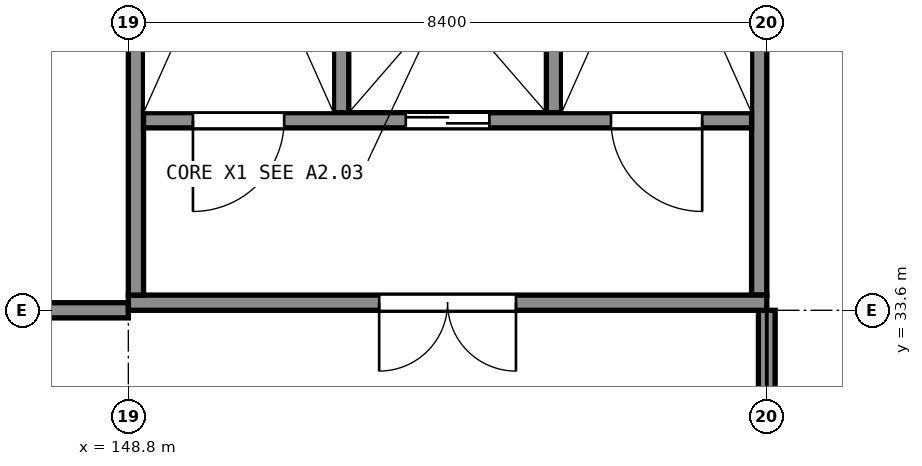
"""IFC4 building model, lengths in metres.
Left out: names, types, materials, properties, quantities, classifications, styles, units other than length and angle.
Written with IfcOpenShell. Run it as: python <this file> out.ifc"""

import sys

from ifc_helpers import new_model, si_unit, direction, frame, frame_2d, origin, place, context, subcontext, project, spatial, rectangle, extrude, element, fill, save


model = new_model("IFC4")
c1 = context("Model", 3, precision=1e-05, world=origin(), true_north=direction((0.0, 1.0)))
c2 = subcontext(c1, "Body", "Model", "MODEL_VIEW")
j1 = project(units=[si_unit("LENGTHUNIT", "METRE"), si_unit("PLANEANGLEUNIT", "RADIAN")], contexts=[c1])
p1 = place(None, origin())
s1 = spatial("IfcSite", under=j1, at=p1, CompositionType="ELEMENT")
p2 = place(p1, origin())
s2 = spatial("IfcBuilding", under=s1, at=p2, CompositionType="ELEMENT")
p3 = place(p2, frame((0.0, 0.0, 10.5)))
s3 = spatial("IfcBuildingStorey", under=s2, at=p3, CompositionType="ELEMENT", Elevation=10.5)
p4 = place(p3, frame((148.8, 33.7, 0.0), z_axis=(0.0, 0.0, 1.0), x_axis=(1.0, 0.0, 0.0)))
e1 = element("IfcWall", 1, at=p4, inside=s3, PredefinedType="SHEAR", context=c2, shape_type="SweptSolid", body=[
    extrude(rectangle(XDim=8.4, YDim=0.2, at=frame_2d((4.2, 0.0))), origin(), (0.0, 0.0, 1.0), 9.5),
])
p5 = place(p4, frame((3.3, 0.0, 0.0)))
e2 = element("IfcOpeningElement", 2, at=p5, cuts=e1, PredefinedType="OPENING", context=c2, shape_type="SweptSolid", body=[
    extrude(rectangle(XDim=1.8, YDim=2.1, at=frame_2d((0.9, 1.05))), frame((0.0, 0.11, 0.0), z_axis=(0.0, -1.0, 0.0), x_axis=(1.0, 0.0, 0.0)), (0.0, 0.0, 1.0), 0.22),
])
for number, where, z_axis, x_axis in (
    (3, (148.9, 33.8, 0.0), (0.0, 0.0, 1.0), (0.0, 1.0, 0.0)),
    (4, (157.1, 33.8, 0.0), (0.0, 0.0, 1.0), (0.0, 1.0, 0.0)),
):
    element("IfcWall", number, at=place(p3, frame(where, z_axis=z_axis, x_axis=x_axis)), inside=s3, PredefinedType="SHEAR", context=c2, shape_type="SweptSolid", body=[
        extrude(rectangle(XDim=8.0, YDim=0.2, at=frame_2d((4.0, 0.0))), origin(), (0.0, 0.0, 1.0), 9.5),
    ])
p6 = place(p3, frame((149.0, 36.1, 0.0), z_axis=(0.0, 0.0, 1.0), x_axis=(1.0, 0.0, 0.0)))
e5 = element("IfcWall", 5, at=p6, inside=s3, PredefinedType="SHEAR", context=c2, shape_type="SweptSolid", body=[
    extrude(rectangle(XDim=8.0, YDim=0.2, at=frame_2d((4.0, 0.0))), origin(), (0.0, 0.0, 1.0), 9.5),
])
p7 = place(p6, frame((0.65, 0.0, 0.0)))
e6 = element("IfcOpeningElement", 6, at=p7, cuts=e5, PredefinedType="OPENING", context=c2, shape_type="SweptSolid", body=[
    extrude(rectangle(XDim=1.2, YDim=2.1, at=frame_2d((0.6, 1.05))), frame((0.0, 0.11, 0.0), z_axis=(0.0, -1.0, 0.0), x_axis=(1.0, 0.0, 0.0)), (0.0, 0.0, 1.0), 0.22),
])
p8 = place(p6, frame((6.15, 0.0, 0.0)))
e7 = element("IfcOpeningElement", 7, at=p8, cuts=e5, PredefinedType="OPENING", context=c2, shape_type="SweptSolid", body=[
    extrude(rectangle(XDim=1.2, YDim=2.1, at=frame_2d((0.6, 1.05))), frame((0.0, 0.11, 0.0), z_axis=(0.0, -1.0, 0.0), x_axis=(1.0, 0.0, 0.0)), (0.0, 0.0, 1.0), 0.22),
])
p9 = place(p6, frame((3.45, 0.0, 0.0)))
e8 = element("IfcOpeningElement", 8, at=p9, cuts=e5, PredefinedType="OPENING", context=c2, shape_type="SweptSolid", body=[
    extrude(rectangle(XDim=1.1, YDim=2.1, at=frame_2d((0.55, 1.05))), frame((0.0, 0.11, 0.0), z_axis=(0.0, -1.0, 0.0), x_axis=(1.0, 0.0, 0.0)), (0.0, 0.0, 1.0), 0.22),
])
for number, where, z_axis, x_axis in (
    (9, (151.6, 36.2, 0.0), (0.0, 0.0, 1.0), (0.0, 1.0, 0.0)),
    (10, (154.4, 36.2, 0.0), (0.0, 0.0, 1.0), (0.0, 1.0, 0.0)),
):
    element("IfcWall", number, at=place(p3, frame(where, z_axis=z_axis, x_axis=x_axis)), inside=s3, PredefinedType="SHEAR", context=c2, shape_type="SweptSolid", body=[
        extrude(rectangle(XDim=5.6, YDim=0.2, at=frame_2d((2.8, 0.0))), origin(), (0.0, 0.0, 1.0), 9.5),
    ])
p10 = place(p3, frame((157.2, 25.55, 0.0), z_axis=(0.0, 0.0, 1.0), x_axis=(0.0, 1.0, 0.0)))
e11 = element("IfcWall", 11, at=p10, inside=s3, PredefinedType="SOLIDWALL", context=c2, shape_type="SweptSolid", body=[
    extrude(rectangle(XDim=8.05, YDim=0.22, at=frame_2d((4.025, 0.0))), origin(), (0.0, 0.0, 1.0), 8.44),
])
p11 = place(p10, frame((4.0, 0.0, 5.0)))
e12 = element("IfcOpeningElement", 12, at=p11, cuts=e11, PredefinedType="OPENING", context=c2, shape_type="SweptSolid", body=[
    extrude(rectangle(XDim=2.4, YDim=1.5, at=frame_2d((1.2, 0.75))), frame((0.0, 0.12, 0.0), z_axis=(0.0, -1.0, 0.0), x_axis=(1.0, 0.0, 0.0)), (0.0, 0.0, 1.0), 0.24),
])
p12 = place(p3, frame((144.5, 33.6, 0.0), z_axis=(0.0, 0.0, 1.0), x_axis=(1.0, 0.0, 0.0)))
e13 = element("IfcWall", 13, at=p12, inside=s3, PredefinedType="PARTITIONING", context=c2, shape_type="SweptSolid", body=[
    extrude(rectangle(XDim=4.3, YDim=0.2, at=frame_2d((2.15, 0.0))), origin(), (0.0, 0.0, 1.0), 8.4),
])
p13 = place(p12, frame((1.75, 0.0, 0.0)))
e14 = element("IfcOpeningElement", 14, at=p13, cuts=e13, PredefinedType="OPENING", context=c2, shape_type="SweptSolid", body=[
    extrude(rectangle(XDim=1.0, YDim=2.1, at=frame_2d((0.5, 1.05))), frame((0.0, 0.11, 0.0), z_axis=(0.0, -1.0, 0.0), x_axis=(1.0, 0.0, 0.0)), (0.0, 0.0, 1.0), 0.22),
])
p14 = place(p5, origin())
e15 = element("IfcDoor", 15, at=p14, inside=s3, OperationType="DOUBLE_DOOR_SINGLE_SWING", PredefinedType="DOOR", context=c2, shape_type="SweptSolid", body=[
    extrude(rectangle(XDim=1.8, YDim=2.1, at=frame_2d((0.9, 1.05))), frame((0.0, 0.025, 0.0), z_axis=(0.0, -1.0, 0.0), x_axis=(1.0, 0.0, 0.0)), (0.0, 0.0, 1.0), 0.05),
])
fill(e2, e15)
p15 = place(p7, origin())
e16 = element("IfcDoor", 16, at=p15, inside=s3, OperationType="SINGLE_SWING_LEFT", PredefinedType="DOOR", context=c2, shape_type="SweptSolid", body=[
    extrude(rectangle(XDim=1.2, YDim=2.1, at=frame_2d((0.6, 1.05))), frame((0.0, 0.025, 0.0), z_axis=(0.0, -1.0, 0.0), x_axis=(1.0, 0.0, 0.0)), (0.0, 0.0, 1.0), 0.05),
])
fill(e6, e16)
p16 = place(p8, origin())
e17 = element("IfcDoor", 17, at=p16, inside=s3, OperationType="SINGLE_SWING_RIGHT", PredefinedType="DOOR", context=c2, shape_type="SweptSolid", body=[
    extrude(rectangle(XDim=1.2, YDim=2.1, at=frame_2d((0.6, 1.05))), frame((0.0, 0.025, 0.0), z_axis=(0.0, -1.0, 0.0), x_axis=(1.0, 0.0, 0.0)), (0.0, 0.0, 1.0), 0.05),
])
fill(e7, e17)
p17 = place(p9, origin())
e18 = element("IfcDoor", 18, at=p17, inside=s3, OperationType="DOUBLE_DOOR_SLIDING", PredefinedType="DOOR", context=c2, shape_type="SweptSolid", body=[
    extrude(rectangle(XDim=1.1, YDim=2.1, at=frame_2d((0.55, 1.05))), frame((0.0, 0.025, 0.0), z_axis=(0.0, -1.0, 0.0), x_axis=(1.0, 0.0, 0.0)), (0.0, 0.0, 1.0), 0.05),
])
fill(e8, e18)
save(model, sys.argv[1])
